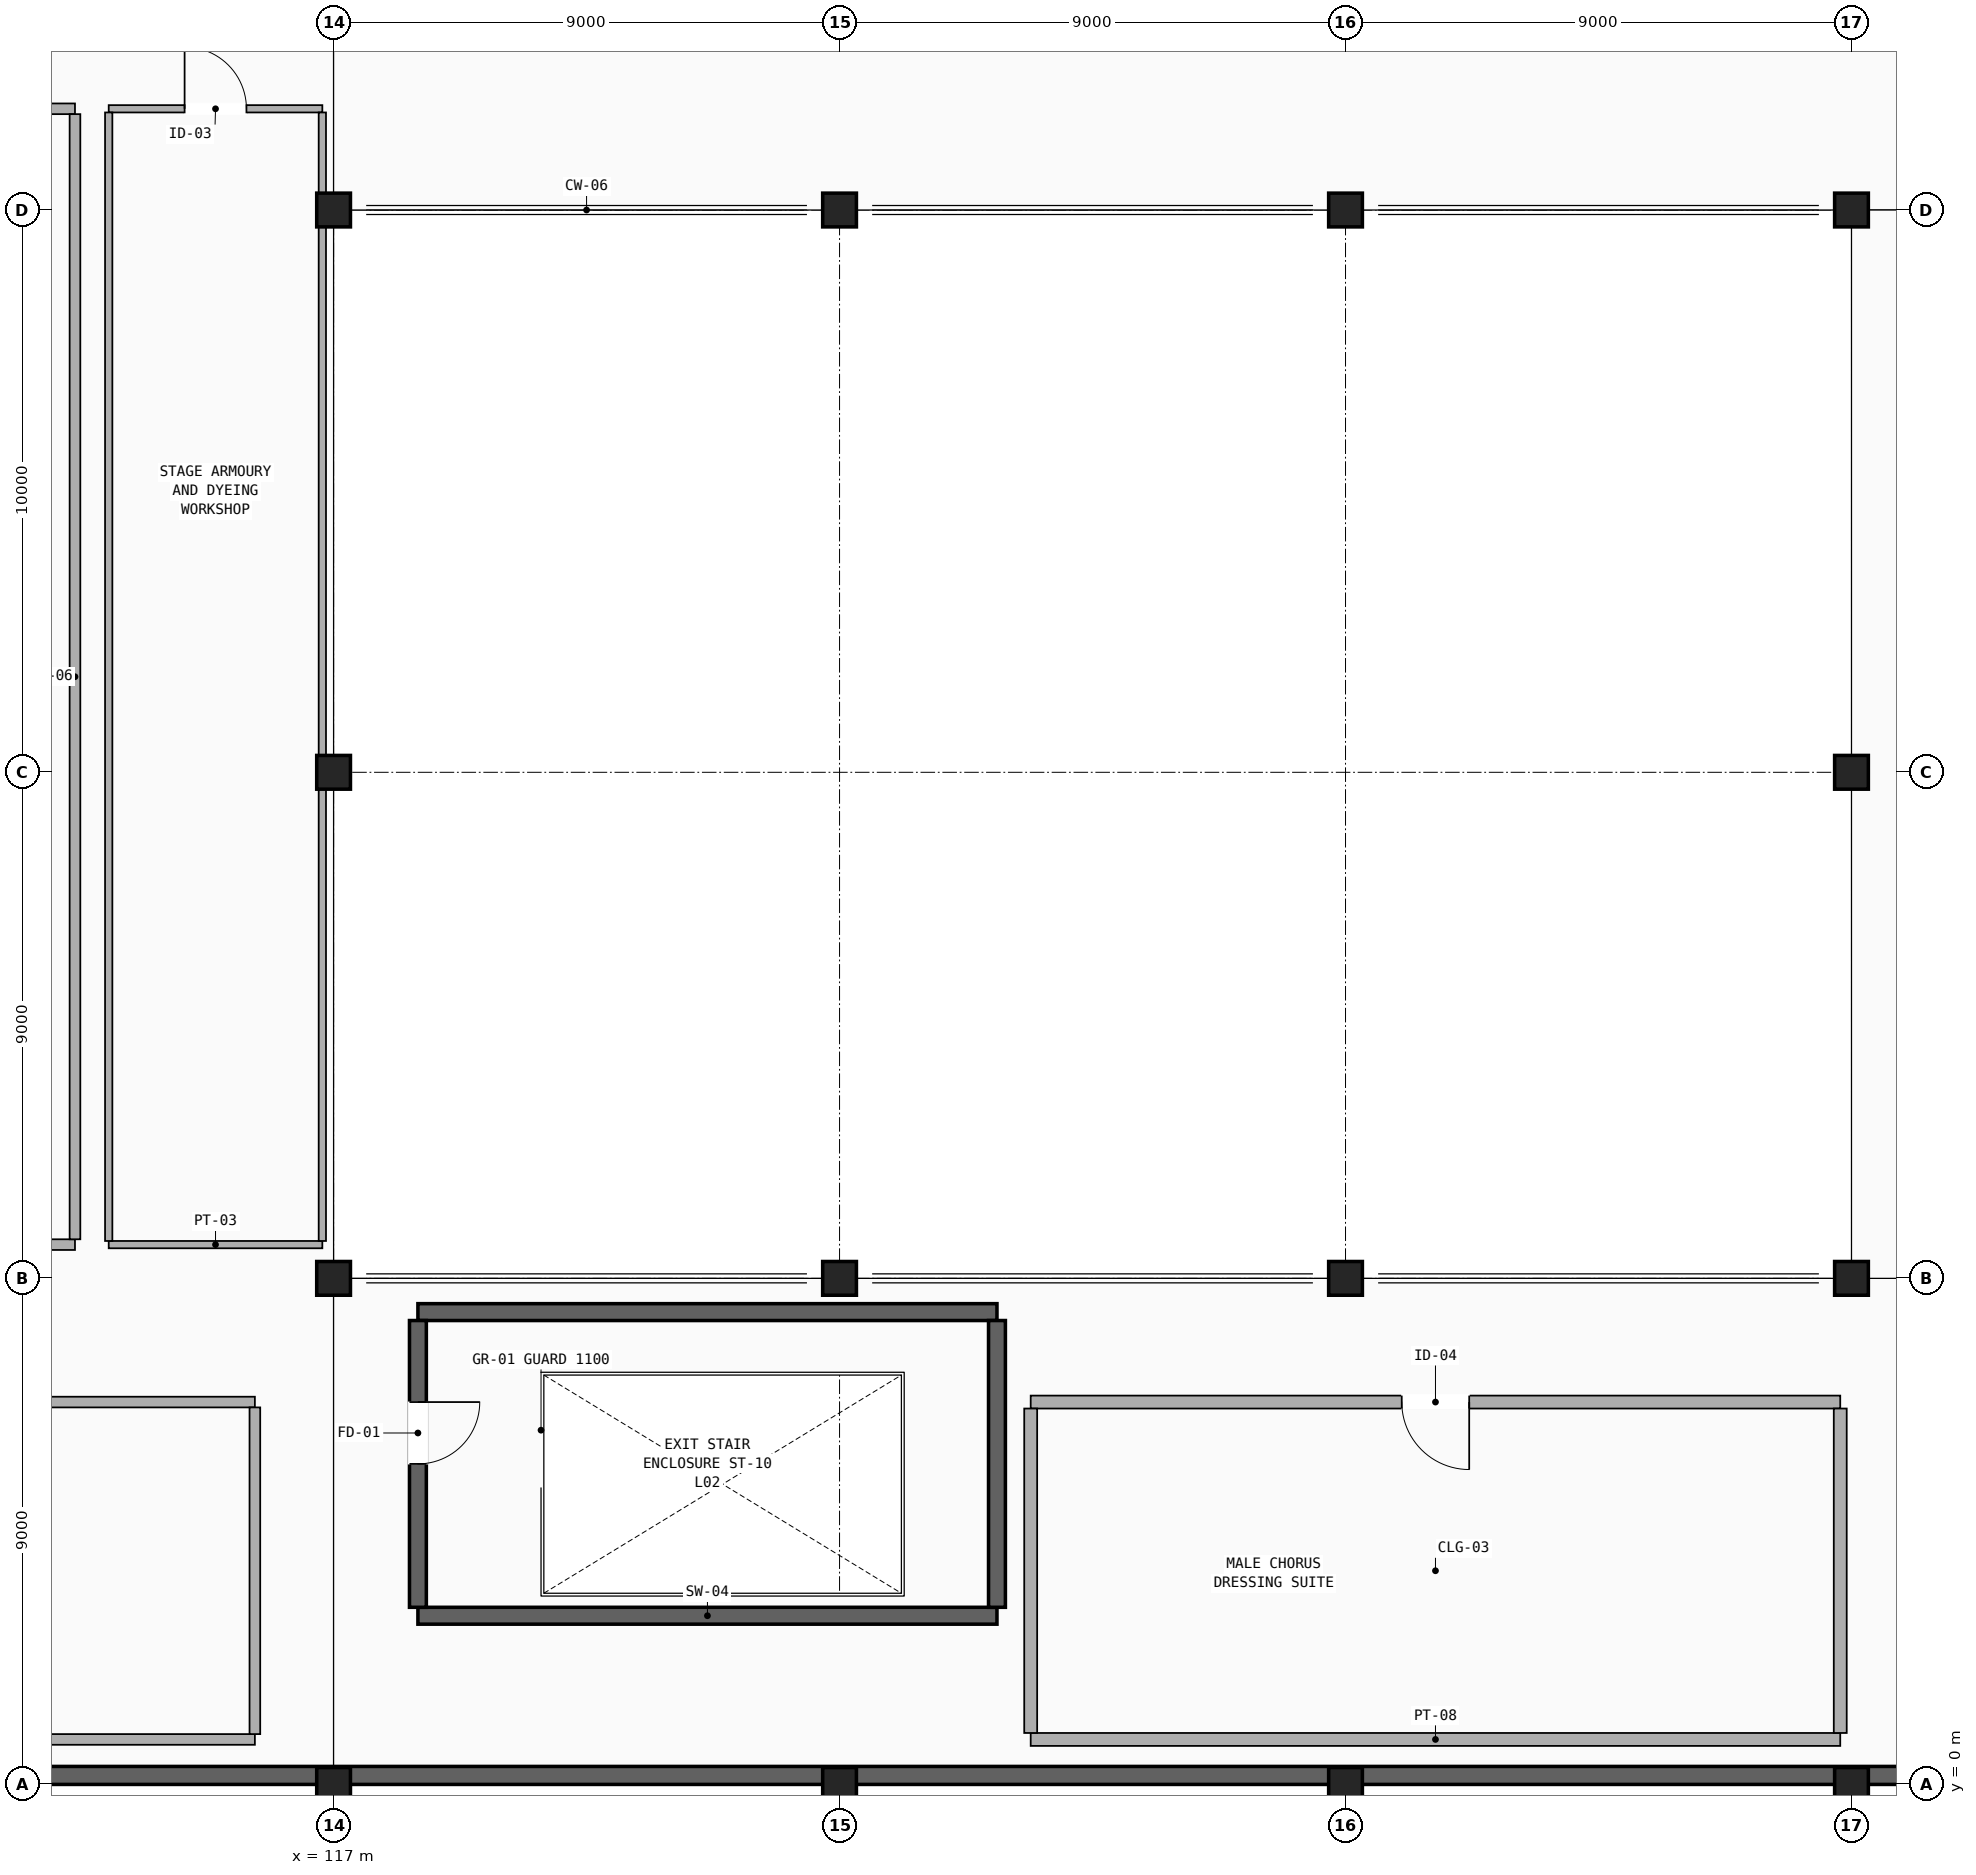
"""IFC4 building model, lengths in metres.
Left out: names, types, materials, properties, quantities, classifications, styles, units other than length and angle.
Written with IfcOpenShell. Run it as: python <this file> out.ifc"""

import sys

from ifc_helpers import new_model, si_unit, direction, frame, frame_2d, origin, origin_2d, place, context, subcontext, project, spatial, rectangle, extrude, element, fill, save


model = new_model("IFC4")
c1 = context("Model", 3, precision=1e-05, world=origin(), true_north=direction((0.0, 1.0)))
c2 = subcontext(c1, "Body", "Model", "MODEL_VIEW")
j1 = project(units=[si_unit("LENGTHUNIT", "METRE"), si_unit("PLANEANGLEUNIT", "RADIAN")], contexts=[c1])
p1 = place(None, origin())
s1 = spatial("IfcSite", under=j1, at=p1, CompositionType="ELEMENT")
p2 = place(p1, origin())
s2 = spatial("IfcBuilding", under=s1, at=p2, CompositionType="ELEMENT")
p3 = place(p2, frame((0.0, 0.0, 9.52)))
s3 = spatial("IfcBuildingStorey", under=s2, at=p3, CompositionType="ELEMENT", Elevation=9.52)
for number, where, z_axis, x_axis in (
    (1, (117.0, 0.0, 0.0), (0.0, 0.0, 1.0), (1.0, 0.0, 0.0)),
    (2, (117.0, 9.0, 0.0), (0.0, 0.0, 1.0), (1.0, 0.0, 0.0)),
    (3, (117.0, 18.0, 0.0), (0.0, 0.0, 1.0), (1.0, 0.0, 0.0)),
    (4, (117.0, 28.0, 0.0), (0.0, 0.0, 1.0), (1.0, 0.0, 0.0)),
    (5, (126.0, 0.0, 0.0), (0.0, 0.0, 1.0), (1.0, 0.0, 0.0)),
    (6, (126.0, 9.0, 0.0), (0.0, 0.0, 1.0), (1.0, 0.0, 0.0)),
    (7, (126.0, 28.0, 0.0), (0.0, 0.0, 1.0), (1.0, 0.0, 0.0)),
    (8, (135.0, 0.0, 0.0), (0.0, 0.0, 1.0), (1.0, 0.0, 0.0)),
    (9, (135.0, 9.0, 0.0), (0.0, 0.0, 1.0), (1.0, 0.0, 0.0)),
    (10, (135.0, 28.0, 0.0), (0.0, 0.0, 1.0), (1.0, 0.0, 0.0)),
    (11, (144.0, 0.0, 0.0), (0.0, 0.0, 1.0), (1.0, 0.0, 0.0)),
    (12, (144.0, 9.0, 0.0), (0.0, 0.0, 1.0), (1.0, 0.0, 0.0)),
    (13, (144.0, 18.0, 0.0), (0.0, 0.0, 1.0), (1.0, 0.0, 0.0)),
    (14, (144.0, 28.0, 0.0), (0.0, 0.0, 1.0), (1.0, 0.0, 0.0)),
):
    element("IfcColumn", number, at=place(p3, frame(where, z_axis=z_axis, x_axis=x_axis)), inside=s3, PredefinedType="COLUMN", context=c2, shape_type="SweptSolid", body=[
        extrude(rectangle(XDim=0.6, YDim=0.6, at=origin_2d()), origin(), (0.0, 0.0, 1.0), 4.08),
    ])
for number, where, z_axis, x_axis in (
    (15, (118.5, 3.0, 0.0), (0.0, 0.0, 1.0), (1.0, 0.0, 0.0)),
    (16, (118.5, 8.4, 0.0), (0.0, 0.0, 1.0), (1.0, 0.0, 0.0)),
):
    element("IfcWall", number, at=place(p3, frame(where, z_axis=z_axis, x_axis=x_axis)), inside=s3, PredefinedType="SHEAR", context=c2, shape_type="SweptSolid", body=[
        extrude(rectangle(XDim=10.3, YDim=0.3, at=frame_2d((5.15, 0.0))), origin(), (0.0, 0.0, 1.0), 4.08),
    ])
p4 = place(p3, frame((118.5, 3.15, 0.0), z_axis=(0.0, 0.0, 1.0), x_axis=(0.0, 1.0, 0.0)))
e17 = element("IfcWall", 17, at=p4, inside=s3, PredefinedType="SHEAR", context=c2, shape_type="SweptSolid", body=[
    extrude(rectangle(XDim=5.1, YDim=0.3, at=frame_2d((2.55, 0.0))), origin(), (0.0, 0.0, 1.0), 4.08),
])
p5 = place(p4, frame((2.55, 0.0, 0.0)))
e18 = element("IfcOpeningElement", 18, at=p5, cuts=e17, PredefinedType="OPENING", context=c2, shape_type="SweptSolid", body=[
    extrude(rectangle(XDim=1.1, YDim=2.2, at=frame_2d((0.55, 1.1))), frame((0.0, 0.16, 0.0), z_axis=(0.0, -1.0, 0.0), x_axis=(1.0, 0.0, 0.0)), (0.0, 0.0, 1.0), 0.32),
])
p6 = place(p3, frame((128.8, 3.15, 0.0), z_axis=(0.0, 0.0, 1.0), x_axis=(0.0, 1.0, 0.0)))
e19 = element("IfcWall", 19, at=p6, inside=s3, PredefinedType="SHEAR", context=c2, shape_type="SweptSolid", body=[
    extrude(rectangle(XDim=5.1, YDim=0.3, at=frame_2d((2.55, 0.0))), origin(), (0.0, 0.0, 1.0), 4.08),
])
p7 = place(p3, frame((73.775, 0.16, 0.0), z_axis=(0.0, 0.0, 1.0), x_axis=(1.0, 0.0, 0.0)))
e20 = element("IfcWall", 20, at=p7, inside=s3, PredefinedType="SHEAR", context=c2, shape_type="SweptSolid", body=[
    extrude(rectangle(XDim=79.875, YDim=0.32, at=frame_2d((39.938, 0.0))), origin(), (0.0, 0.0, 1.0), 4.08),
])
p8 = place(p3, frame((74.2, 9.6, 0.0), z_axis=(0.0, 0.0, 1.0), x_axis=(1.0, 0.0, 0.0)))
e21 = element("IfcWall", 21, at=p8, inside=s3, PredefinedType="PARTITIONING", context=c2, shape_type="SweptSolid", body=[
    extrude(rectangle(XDim=38.2, YDim=0.19, at=frame_2d((19.1, 0.0))), origin(), (0.0, 0.0, 1.0), 2.97),
])
p9 = place(p3, frame((74.2, 29.8, 0.0), z_axis=(0.0, 0.0, 1.0), x_axis=(1.0, 0.0, 0.0)))
e22 = element("IfcWall", 22, at=p9, inside=s3, PredefinedType="PARTITIONING", context=c2, shape_type="SweptSolid", body=[
    extrude(rectangle(XDim=38.2, YDim=0.19, at=frame_2d((19.1, 0.0))), origin(), (0.0, 0.0, 1.0), 2.94),
])
p10 = place(p9, frame((18.3, 0.0, 0.0)))
e23 = element("IfcOpeningElement", 23, at=p10, cuts=e22, PredefinedType="OPENING", context=c2, shape_type="SweptSolid", body=[
    extrude(rectangle(XDim=1.6, YDim=2.25, at=frame_2d((0.8, 1.125))), frame((0.0, 0.105, 0.0), z_axis=(0.0, -1.0, 0.0), x_axis=(1.0, 0.0, 0.0)), (0.0, 0.0, 1.0), 0.21),
])
p11 = place(p3, frame((112.4, 9.695, 0.0), z_axis=(0.0, 0.0, 1.0), x_axis=(0.0, 1.0, 0.0)))
e24 = element("IfcWall", 24, at=p11, inside=s3, PredefinedType="PARTITIONING", context=c2, shape_type="SweptSolid", body=[
    extrude(rectangle(XDim=20.01, YDim=0.19, at=frame_2d((10.005, 0.0))), origin(), (0.0, 0.0, 1.0), 2.79),
])
p12 = place(p3, frame((129.4, 0.8, 0.0), z_axis=(0.0, 0.0, 1.0), x_axis=(1.0, 0.0, 0.0)))
e25 = element("IfcWall", 25, at=p12, inside=s3, PredefinedType="PARTITIONING", context=c2, shape_type="SweptSolid", body=[
    extrude(rectangle(XDim=14.4, YDim=0.23, at=frame_2d((7.2, 0.0))), origin(), (0.0, 0.0, 1.0), 3.277),
])
p13 = place(p3, frame((129.4, 6.8, 0.0), z_axis=(0.0, 0.0, 1.0), x_axis=(1.0, 0.0, 0.0)))
e26 = element("IfcWall", 26, at=p13, inside=s3, PredefinedType="PARTITIONING", context=c2, shape_type="SweptSolid", body=[
    extrude(rectangle(XDim=14.4, YDim=0.23, at=frame_2d((7.2, 0.0))), origin(), (0.0, 0.0, 1.0), 3.277),
])
p14 = place(p13, frame((6.6, 0.0, 0.0)))
e27 = element("IfcOpeningElement", 27, at=p14, cuts=e26, PredefinedType="OPENING", context=c2, shape_type="SweptSolid", body=[
    extrude(rectangle(XDim=1.2, YDim=2.2, at=frame_2d((0.6, 1.1))), frame((0.0, 0.125, 0.0), z_axis=(0.0, -1.0, 0.0), x_axis=(1.0, 0.0, 0.0)), (0.0, 0.0, 1.0), 0.25),
])
p15 = place(p3, frame((129.4, 0.915, 0.0), z_axis=(0.0, 0.0, 1.0), x_axis=(0.0, 1.0, 0.0)))
e28 = element("IfcWall", 28, at=p15, inside=s3, PredefinedType="PARTITIONING", context=c2, shape_type="SweptSolid", body=[
    extrude(rectangle(XDim=5.77, YDim=0.23, at=frame_2d((2.885, 0.0))), origin(), (0.0, 0.0, 1.0), 3.84),
])
p16 = place(p3, frame((143.8, 0.915, 0.0), z_axis=(0.0, 0.0, 1.0), x_axis=(0.0, 1.0, 0.0)))
e29 = element("IfcWall", 29, at=p16, inside=s3, PredefinedType="PARTITIONING", context=c2, shape_type="SweptSolid", body=[
    extrude(rectangle(XDim=5.77, YDim=0.23, at=frame_2d((2.885, 0.0))), origin(), (0.0, 0.0, 1.0), 3.277),
])
p17 = place(p3, frame((113.0, 9.6, 0.0), z_axis=(0.0, 0.0, 1.0), x_axis=(1.0, 0.0, 0.0)))
e30 = element("IfcWall", 30, at=p17, inside=s3, PredefinedType="PARTITIONING", context=c2, shape_type="SweptSolid", body=[
    extrude(rectangle(XDim=3.8, YDim=0.13, at=frame_2d((1.9, 0.0))), origin(), (0.0, 0.0, 1.0), 3.14),
])
p18 = place(p3, frame((113.0, 29.8, 0.0), z_axis=(0.0, 0.0, 1.0), x_axis=(1.0, 0.0, 0.0)))
e31 = element("IfcWall", 31, at=p18, inside=s3, PredefinedType="PARTITIONING", context=c2, shape_type="SweptSolid", body=[
    extrude(rectangle(XDim=3.8, YDim=0.13, at=frame_2d((1.9, 0.0))), origin(), (0.0, 0.0, 1.0), 3.09),
])
p19 = place(p18, frame((1.35, 0.0, 0.0)))
e32 = element("IfcOpeningElement", 32, at=p19, cuts=e31, PredefinedType="OPENING", context=c2, shape_type="SweptSolid", body=[
    extrude(rectangle(XDim=1.1, YDim=2.2, at=frame_2d((0.55, 1.1))), frame((0.0, 0.075, 0.0), z_axis=(0.0, -1.0, 0.0), x_axis=(1.0, 0.0, 0.0)), (0.0, 0.0, 1.0), 0.15),
])
for number, where, z_axis, x_axis in (
    (33, (113.0, 9.665, 0.0), (0.0, 0.0, 1.0), (0.0, 1.0, 0.0)),
    (34, (116.8, 9.665, 0.0), (0.0, 0.0, 1.0), (0.0, 1.0, 0.0)),
):
    element("IfcWall", number, at=place(p3, frame(where, z_axis=z_axis, x_axis=x_axis)), inside=s3, PredefinedType="PARTITIONING", context=c2, shape_type="SweptSolid", body=[
        extrude(rectangle(XDim=20.07, YDim=0.13, at=frame_2d((10.035, 0.0))), origin(), (0.0, 0.0, 1.0), 2.79),
    ])
p20 = place(p3, frame((74.2, 0.8, 0.0), z_axis=(0.0, 0.0, 1.0), x_axis=(1.0, 0.0, 0.0)))
e35 = element("IfcWall", 35, at=p20, inside=s3, PredefinedType="PARTITIONING", context=c2, shape_type="SweptSolid", body=[
    extrude(rectangle(XDim=41.4, YDim=0.19, at=frame_2d((20.7, 0.0))), origin(), (0.0, 0.0, 1.0), 2.97),
])
p21 = place(p3, frame((74.2, 6.8, 0.0), z_axis=(0.0, 0.0, 1.0), x_axis=(1.0, 0.0, 0.0)))
e36 = element("IfcWall", 36, at=p21, inside=s3, PredefinedType="PARTITIONING", context=c2, shape_type="SweptSolid", body=[
    extrude(rectangle(XDim=41.4, YDim=0.19, at=frame_2d((20.7, 0.0))), origin(), (0.0, 0.0, 1.0), 2.97),
])
p22 = place(p21, frame((20.1, 0.0, 0.0)))
e37 = element("IfcOpeningElement", 37, at=p22, cuts=e36, PredefinedType="OPENING", context=c2, shape_type="SweptSolid", body=[
    extrude(rectangle(XDim=1.2, YDim=2.2, at=frame_2d((0.6, 1.1))), frame((0.0, 0.105, 0.0), z_axis=(0.0, -1.0, 0.0), x_axis=(1.0, 0.0, 0.0)), (0.0, 0.0, 1.0), 0.21),
])
p23 = place(p3, frame((115.6, 0.895, 0.0), z_axis=(0.0, 0.0, 1.0), x_axis=(0.0, 1.0, 0.0)))
e38 = element("IfcWall", 38, at=p23, inside=s3, PredefinedType="PARTITIONING", context=c2, shape_type="SweptSolid", body=[
    extrude(rectangle(XDim=5.81, YDim=0.19, at=frame_2d((2.905, 0.0))), origin(), (0.0, 0.0, 1.0), 3.84),
])
p24 = place(p5, frame((1.1, 0.0, 0.0), z_axis=(0.0, 0.0, 1.0), x_axis=(-1.0, 0.0, 0.0)))
e39 = element("IfcDoor", 39, at=p24, inside=s3, OperationType="SINGLE_SWING_LEFT", PredefinedType="DOOR", context=c2, shape_type="SweptSolid", body=[
    extrude(rectangle(XDim=1.1, YDim=2.2, at=frame_2d((0.55, 1.1))), frame((0.0, 0.025, 0.0), z_axis=(0.0, -1.0, 0.0), x_axis=(1.0, 0.0, 0.0)), (0.0, 0.0, 1.0), 0.05),
])
fill(e18, e39)
p25 = place(p14, frame((1.2, 0.0, 0.0), z_axis=(0.0, 0.0, 1.0), x_axis=(-1.0, 0.0, 0.0)))
e40 = element("IfcDoor", 40, at=p25, inside=s3, OperationType="SINGLE_SWING_LEFT", PredefinedType="DOOR", context=c2, shape_type="SweptSolid", body=[
    extrude(rectangle(XDim=1.2, YDim=2.2, at=frame_2d((0.6, 1.1))), frame((0.0, 0.025, 0.0), z_axis=(0.0, -1.0, 0.0), x_axis=(1.0, 0.0, 0.0)), (0.0, 0.0, 1.0), 0.05),
])
fill(e27, e40)
p26 = place(p19, origin())
e41 = element("IfcDoor", 41, at=p26, inside=s3, OperationType="SINGLE_SWING_LEFT", PredefinedType="DOOR", context=c2, shape_type="SweptSolid", body=[
    extrude(rectangle(XDim=1.1, YDim=2.2, at=frame_2d((0.55, 1.1))), frame((0.0, 0.025, 0.0), z_axis=(0.0, -1.0, 0.0), x_axis=(1.0, 0.0, 0.0)), (0.0, 0.0, 1.0), 0.05),
])
fill(e32, e41)
save(model, sys.argv[1])
